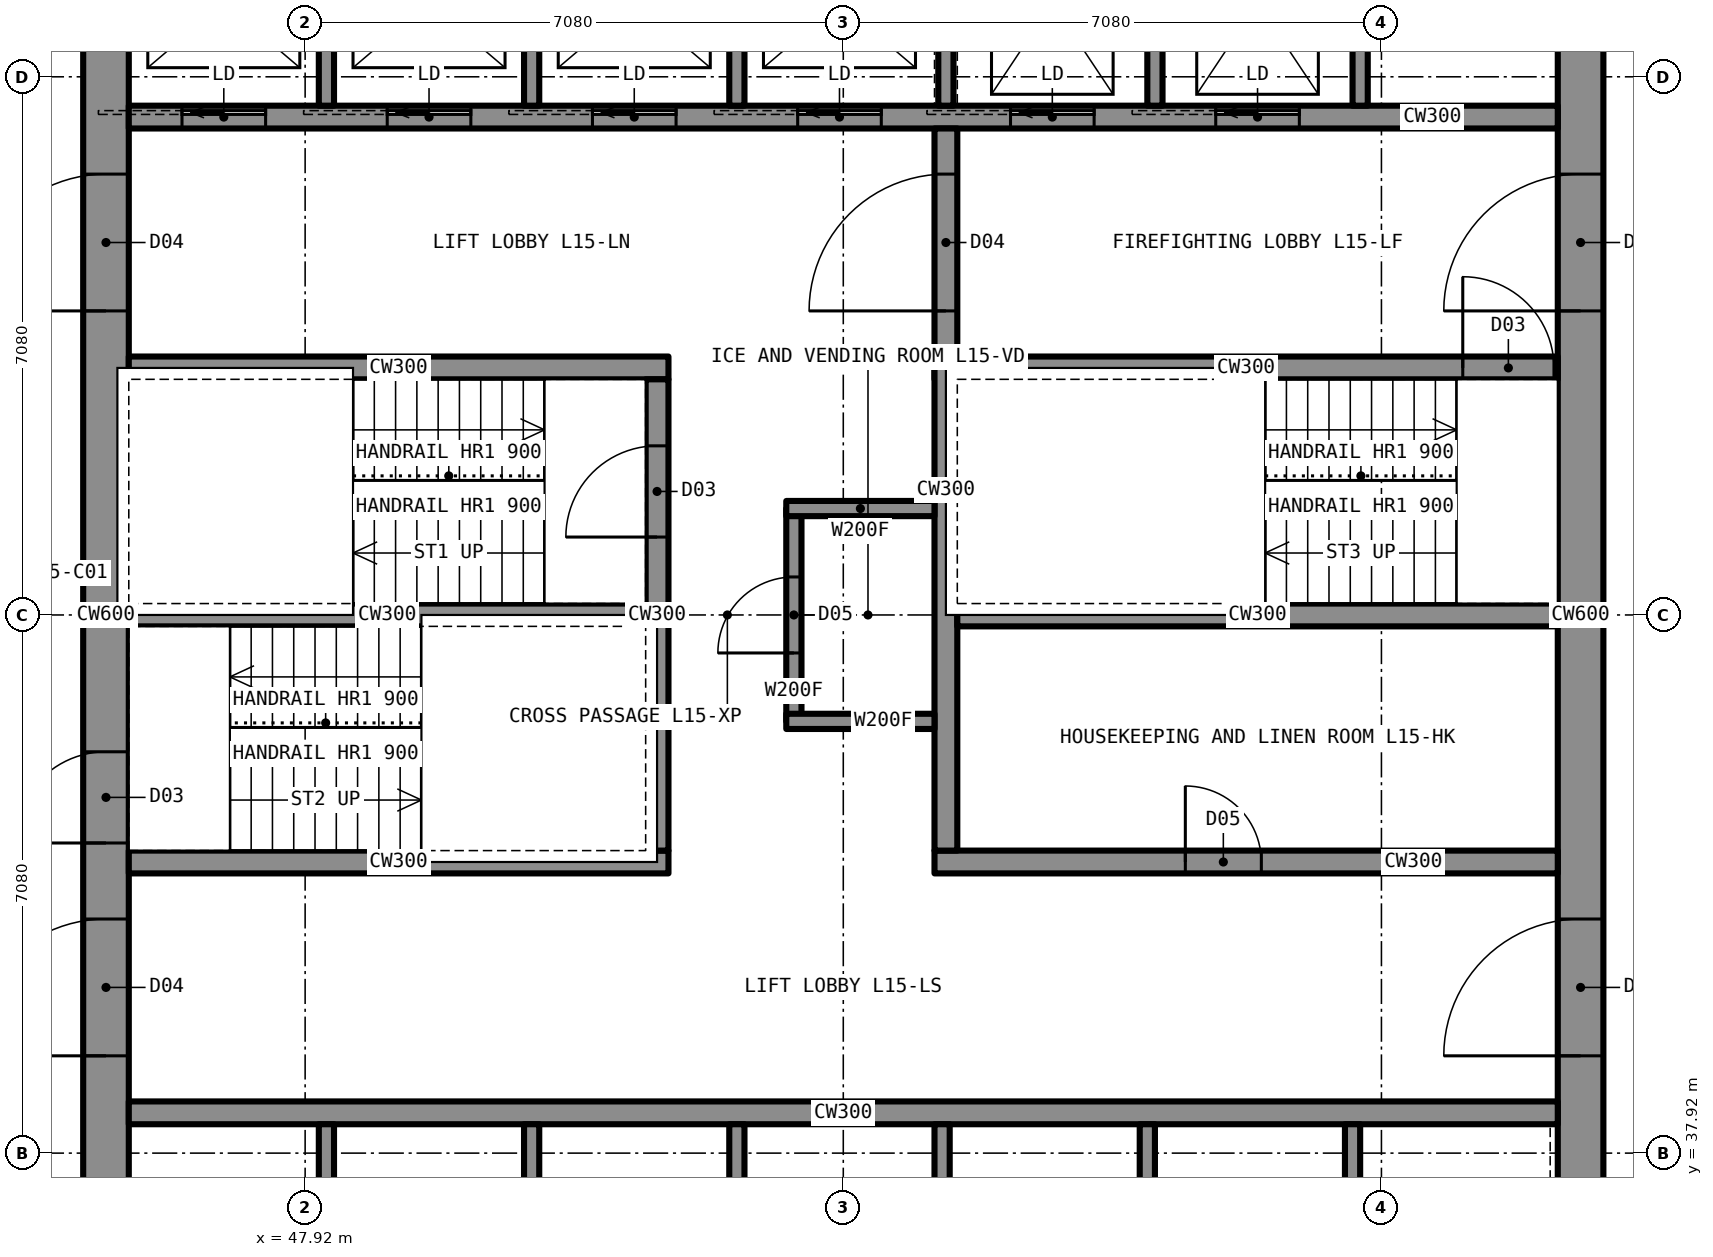
"""IFC4 building model, lengths in metres.
Left out: names, types, materials, properties, quantities, classifications, styles, units other than length and angle.
Written with IfcOpenShell. Run it as: python <this file> out.ifc"""

import sys

from ifc_helpers import new_model, si_unit, direction, frame, frame_2d, origin, place, context, subcontext, project, spatial, rectangle, extrude, element, fill, save


model = new_model("IFC4")
c1 = context("Model", 3, precision=1e-05, world=origin(), true_north=direction((0.0, 1.0)))
c2 = subcontext(c1, "Body", "Model", "MODEL_VIEW")
j1 = project(units=[si_unit("LENGTHUNIT", "METRE"), si_unit("PLANEANGLEUNIT", "RADIAN")], contexts=[c1])
p1 = place(None, origin())
s1 = spatial("IfcSite", under=j1, at=p1, CompositionType="ELEMENT")
p2 = place(p1, origin())
s2 = spatial("IfcBuilding", under=s1, at=p2, CompositionType="ELEMENT")
p3 = place(p2, frame((0.0, 0.0, 60.0)))
s3 = spatial("IfcBuildingStorey", under=s2, at=p3, CompositionType="ELEMENT", Elevation=60.0)
p4 = place(p3, frame((64.7, 35.6, 0.0), z_axis=(0.0, 0.0, 1.0), x_axis=(0.0, 1.0, 0.0)))
e1 = element("IfcWall", 1, at=p4, inside=s3, PredefinedType="SHEAR", context=c2, shape_type="SweptSolid", body=[
    extrude(rectangle(XDim=18.8, YDim=0.6, at=frame_2d((9.4, 0.0))), origin(), (0.0, 0.0, 1.0), 3.5),
])
p5 = place(p4, frame((13.4, 0.0, 0.0)))
e2 = element("IfcOpeningElement", 2, at=p5, cuts=e1, PredefinedType="OPENING", context=c2, shape_type="SweptSolid", body=[
    extrude(rectangle(XDim=1.8, YDim=2.2, at=frame_2d((0.9, 1.1))), frame((0.0, 0.31, 0.0), z_axis=(0.0, -1.0, 0.0), x_axis=(1.0, 0.0, 0.0)), (0.0, 0.0, 1.0), 0.62),
])
p6 = place(p4, frame((3.6, 0.0, 0.0)))
e3 = element("IfcOpeningElement", 3, at=p6, cuts=e1, PredefinedType="OPENING", context=c2, shape_type="SweptSolid", body=[
    extrude(rectangle(XDim=1.8, YDim=2.2, at=frame_2d((0.9, 1.1))), frame((0.0, 0.31, 0.0), z_axis=(0.0, -1.0, 0.0), x_axis=(1.0, 0.0, 0.0)), (0.0, 0.0, 1.0), 0.62),
])
p7 = place(p3, frame((45.3, 35.6, 0.0), z_axis=(0.0, 0.0, 1.0), x_axis=(0.0, 1.0, 0.0)))
e4 = element("IfcWall", 4, at=p7, inside=s3, PredefinedType="SHEAR", context=c2, shape_type="SweptSolid", body=[
    extrude(rectangle(XDim=18.8, YDim=0.6, at=frame_2d((9.4, 0.0))), origin(), (0.0, 0.0, 1.0), 3.5),
])
p8 = place(p7, frame((13.4, 0.0, 0.0)))
e5 = element("IfcOpeningElement", 5, at=p8, cuts=e4, PredefinedType="OPENING", context=c2, shape_type="SweptSolid", body=[
    extrude(rectangle(XDim=1.8, YDim=2.2, at=frame_2d((0.9, 1.1))), frame((0.0, 0.31, 0.0), z_axis=(0.0, -1.0, 0.0), x_axis=(1.0, 0.0, 0.0)), (0.0, 0.0, 1.0), 0.62),
])
p9 = place(p7, frame((3.6, 0.0, 0.0)))
e6 = element("IfcOpeningElement", 6, at=p9, cuts=e4, PredefinedType="OPENING", context=c2, shape_type="SweptSolid", body=[
    extrude(rectangle(XDim=1.8, YDim=2.2, at=frame_2d((0.9, 1.1))), frame((0.0, 0.31, 0.0), z_axis=(0.0, -1.0, 0.0), x_axis=(1.0, 0.0, 0.0)), (0.0, 0.0, 1.0), 0.62),
])
p10 = place(p7, frame((6.4, 0.0, 0.0)))
e7 = element("IfcOpeningElement", 7, at=p10, cuts=e4, PredefinedType="OPENING", context=c2, shape_type="SweptSolid", body=[
    extrude(rectangle(XDim=1.2, YDim=2.2, at=frame_2d((0.6, 1.1))), frame((0.0, 0.31, 0.0), z_axis=(0.0, -1.0, 0.0), x_axis=(1.0, 0.0, 0.0)), (0.0, 0.0, 1.0), 0.62),
])
p11 = place(p3, frame((45.6, 51.55, 0.0), z_axis=(0.0, 0.0, 1.0), x_axis=(1.0, 0.0, 0.0)))
e8 = element("IfcWall", 8, at=p11, inside=s3, PredefinedType="SHEAR", context=c2, shape_type="SweptSolid", body=[
    extrude(rectangle(XDim=18.8, YDim=0.3, at=frame_2d((9.4, 0.0))), origin(), (0.0, 0.0, 1.0), 3.5),
])
p12 = place(p11, frame((0.7, 0.0, 0.0)))
e9 = element("IfcOpeningElement", 9, at=p12, cuts=e8, PredefinedType="OPENING", context=c2, shape_type="SweptSolid", body=[
    extrude(rectangle(XDim=1.1, YDim=2.2, at=frame_2d((0.55, 1.1))), frame((0.0, 0.16, 0.0), z_axis=(0.0, -1.0, 0.0), x_axis=(1.0, 0.0, 0.0)), (0.0, 0.0, 1.0), 0.32),
])
p13 = place(p11, frame((3.4, 0.0, 0.0)))
e10 = element("IfcOpeningElement", 10, at=p13, cuts=e8, PredefinedType="OPENING", context=c2, shape_type="SweptSolid", body=[
    extrude(rectangle(XDim=1.1, YDim=2.2, at=frame_2d((0.55, 1.1))), frame((0.0, 0.16, 0.0), z_axis=(0.0, -1.0, 0.0), x_axis=(1.0, 0.0, 0.0)), (0.0, 0.0, 1.0), 0.32),
])
p14 = place(p11, frame((6.1, 0.0, 0.0)))
e11 = element("IfcOpeningElement", 11, at=p14, cuts=e8, PredefinedType="OPENING", context=c2, shape_type="SweptSolid", body=[
    extrude(rectangle(XDim=1.1, YDim=2.2, at=frame_2d((0.55, 1.1))), frame((0.0, 0.16, 0.0), z_axis=(0.0, -1.0, 0.0), x_axis=(1.0, 0.0, 0.0)), (0.0, 0.0, 1.0), 0.32),
])
p15 = place(p11, frame((8.8, 0.0, 0.0)))
e12 = element("IfcOpeningElement", 12, at=p15, cuts=e8, PredefinedType="OPENING", context=c2, shape_type="SweptSolid", body=[
    extrude(rectangle(XDim=1.1, YDim=2.2, at=frame_2d((0.55, 1.1))), frame((0.0, 0.16, 0.0), z_axis=(0.0, -1.0, 0.0), x_axis=(1.0, 0.0, 0.0)), (0.0, 0.0, 1.0), 0.32),
])
p16 = place(p11, frame((11.6, 0.0, 0.0)))
e13 = element("IfcOpeningElement", 13, at=p16, cuts=e8, PredefinedType="OPENING", context=c2, shape_type="SweptSolid", body=[
    extrude(rectangle(XDim=1.1, YDim=2.2, at=frame_2d((0.55, 1.1))), frame((0.0, 0.16, 0.0), z_axis=(0.0, -1.0, 0.0), x_axis=(1.0, 0.0, 0.0)), (0.0, 0.0, 1.0), 0.32),
])
p17 = place(p11, frame((14.3, 0.0, 0.0)))
e14 = element("IfcOpeningElement", 14, at=p17, cuts=e8, PredefinedType="OPENING", context=c2, shape_type="SweptSolid", body=[
    extrude(rectangle(XDim=1.1, YDim=2.2, at=frame_2d((0.55, 1.1))), frame((0.0, 0.16, 0.0), z_axis=(0.0, -1.0, 0.0), x_axis=(1.0, 0.0, 0.0)), (0.0, 0.0, 1.0), 0.32),
])
p18 = place(p3, frame((45.6, 38.45, 0.0), z_axis=(0.0, 0.0, 1.0), x_axis=(1.0, 0.0, 0.0)))
e15 = element("IfcWall", 15, at=p18, inside=s3, PredefinedType="SHEAR", context=c2, shape_type="SweptSolid", body=[
    extrude(rectangle(XDim=18.8, YDim=0.3, at=frame_2d((9.4, 0.0))), origin(), (0.0, 0.0, 1.0), 3.5),
])
p19 = place(p3, frame((45.6, 48.25, 0.0), z_axis=(0.0, 0.0, 1.0), x_axis=(1.0, 0.0, 0.0)))
e16 = element("IfcWall", 16, at=p19, inside=s3, PredefinedType="SHEAR", context=c2, shape_type="SweptSolid", body=[
    extrude(rectangle(XDim=7.1, YDim=0.3, at=frame_2d((3.55, 0.0))), origin(), (0.0, 0.0, 1.0), 3.5),
])
p20 = place(p3, frame((56.2, 48.25, 0.0), z_axis=(0.0, 0.0, 1.0), x_axis=(1.0, 0.0, 0.0)))
e17 = element("IfcWall", 17, at=p20, inside=s3, PredefinedType="SHEAR", context=c2, shape_type="SweptSolid", body=[
    extrude(rectangle(XDim=8.2, YDim=0.3, at=frame_2d((4.1, 0.0))), origin(), (0.0, 0.0, 1.0), 3.5),
])
p21 = place(p20, frame((6.95, 0.0, 0.0)))
e18 = element("IfcOpeningElement", 18, at=p21, cuts=e17, PredefinedType="OPENING", context=c2, shape_type="SweptSolid", body=[
    extrude(rectangle(XDim=1.2, YDim=2.2, at=frame_2d((0.6, 1.1))), frame((0.0, 0.16, 0.0), z_axis=(0.0, -1.0, 0.0), x_axis=(1.0, 0.0, 0.0)), (0.0, 0.0, 1.0), 0.32),
])
p22 = place(p3, frame((45.6, 41.75, 0.0), z_axis=(0.0, 0.0, 1.0), x_axis=(1.0, 0.0, 0.0)))
e19 = element("IfcWall", 19, at=p22, inside=s3, PredefinedType="SHEAR", context=c2, shape_type="SweptSolid", body=[
    extrude(rectangle(XDim=7.1, YDim=0.3, at=frame_2d((3.55, 0.0))), origin(), (0.0, 0.0, 1.0), 3.5),
])
p23 = place(p3, frame((56.2, 41.75, 0.0), z_axis=(0.0, 0.0, 1.0), x_axis=(1.0, 0.0, 0.0)))
e20 = element("IfcWall", 20, at=p23, inside=s3, PredefinedType="SHEAR", context=c2, shape_type="SweptSolid", body=[
    extrude(rectangle(XDim=8.2, YDim=0.3, at=frame_2d((4.1, 0.0))), origin(), (0.0, 0.0, 1.0), 3.5),
])
p24 = place(p23, frame((3.3, 0.0, 0.0)))
e21 = element("IfcOpeningElement", 21, at=p24, cuts=e20, PredefinedType="OPENING", context=c2, shape_type="SweptSolid", body=[
    extrude(rectangle(XDim=1.0, YDim=2.1, at=frame_2d((0.5, 1.05))), frame((0.0, 0.16, 0.0), z_axis=(0.0, -1.0, 0.0), x_axis=(1.0, 0.0, 0.0)), (0.0, 0.0, 1.0), 0.32),
])
p25 = place(p3, frame((52.55, 41.9, 0.0), z_axis=(0.0, 0.0, 1.0), x_axis=(0.0, 1.0, 0.0)))
e22 = element("IfcWall", 22, at=p25, inside=s3, PredefinedType="SHEAR", context=c2, shape_type="SweptSolid", body=[
    extrude(rectangle(XDim=6.2, YDim=0.3, at=frame_2d((3.1, 0.0))), origin(), (0.0, 0.0, 1.0), 3.5),
])
p26 = place(p25, frame((4.125, 0.0, 0.0)))
e23 = element("IfcOpeningElement", 23, at=p26, cuts=e22, PredefinedType="OPENING", context=c2, shape_type="SweptSolid", body=[
    extrude(rectangle(XDim=1.2, YDim=2.2, at=frame_2d((0.6, 1.1))), frame((0.0, 0.16, 0.0), z_axis=(0.0, -1.0, 0.0), x_axis=(1.0, 0.0, 0.0)), (0.0, 0.0, 1.0), 0.32),
])
p27 = place(p3, frame((56.35, 41.9, 0.0), z_axis=(0.0, 0.0, 1.0), x_axis=(0.0, 1.0, 0.0)))
e24 = element("IfcWall", 24, at=p27, inside=s3, PredefinedType="SHEAR", context=c2, shape_type="SweptSolid", body=[
    extrude(rectangle(XDim=9.5, YDim=0.3, at=frame_2d((4.75, 0.0))), origin(), (0.0, 0.0, 1.0), 3.5),
])
p28 = place(p27, frame((7.1, 0.0, 0.0)))
e25 = element("IfcOpeningElement", 25, at=p28, cuts=e24, PredefinedType="OPENING", context=c2, shape_type="SweptSolid", body=[
    extrude(rectangle(XDim=1.8, YDim=2.2, at=frame_2d((0.9, 1.1))), frame((0.0, 0.16, 0.0), z_axis=(0.0, -1.0, 0.0), x_axis=(1.0, 0.0, 0.0)), (0.0, 0.0, 1.0), 0.32),
])
p29 = place(p3, frame((45.6, 45.0, 0.0), z_axis=(0.0, 0.0, 1.0), x_axis=(1.0, 0.0, 0.0)))
e26 = element("IfcWall", 26, at=p29, inside=s3, PredefinedType="SHEAR", context=c2, shape_type="SweptSolid", body=[
    extrude(rectangle(XDim=6.8, YDim=0.3, at=frame_2d((3.4, 0.0))), origin(), (0.0, 0.0, 1.0), 3.5),
])
p30 = place(p3, frame((56.5, 45.0, 0.0), z_axis=(0.0, 0.0, 1.0), x_axis=(1.0, 0.0, 0.0)))
e27 = element("IfcWall", 27, at=p30, inside=s3, PredefinedType="SHEAR", context=c2, shape_type="SweptSolid", body=[
    extrude(rectangle(XDim=7.9, YDim=0.3, at=frame_2d((3.95, 0.0))), origin(), (0.0, 0.0, 1.0), 3.5),
])
p31 = place(p3, frame((54.35, 43.6, 0.0), z_axis=(0.0, 0.0, 1.0), x_axis=(0.0, 1.0, 0.0)))
e28 = element("IfcWall", 28, at=p31, inside=s3, PredefinedType="PARTITIONING", context=c2, shape_type="SweptSolid", body=[
    extrude(rectangle(XDim=2.8, YDim=0.2, at=frame_2d((1.4, 0.0))), origin(), (0.0, 0.0, 1.0), 3.33),
])
p32 = place(p31, frame((0.9, 0.0, 0.0)))
e29 = element("IfcOpeningElement", 29, at=p32, cuts=e28, PredefinedType="OPENING", context=c2, shape_type="SweptSolid", body=[
    extrude(rectangle(XDim=1.0, YDim=2.1, at=frame_2d((0.5, 1.05))), frame((0.0, 0.11, 0.0), z_axis=(0.0, -1.0, 0.0), x_axis=(1.0, 0.0, 0.0)), (0.0, 0.0, 1.0), 0.22),
])
for number, where, z_axis, x_axis in (
    (30, (54.25, 43.6, 0.0), (0.0, 0.0, 1.0), (1.0, 0.0, 0.0)),
    (31, (54.25, 46.4, 0.0), (0.0, 0.0, 1.0), (1.0, 0.0, 0.0)),
):
    element("IfcWall", number, at=place(p3, frame(where, z_axis=z_axis, x_axis=x_axis)), inside=s3, PredefinedType="PARTITIONING", context=c2, shape_type="SweptSolid", body=[
        extrude(rectangle(XDim=1.95, YDim=0.2, at=frame_2d((0.975, 0.0))), origin(), (0.0, 0.0, 1.0), 3.33),
    ])
for number, where, z_axis, x_axis in (
    (32, (48.2, 51.7, 0.0), (0.0, 0.0, 1.0), (0.0, 1.0, 0.0)),
    (33, (50.9, 51.7, 0.0), (0.0, 0.0, 1.0), (0.0, 1.0, 0.0)),
    (34, (53.6, 51.7, 0.0), (0.0, 0.0, 1.0), (0.0, 1.0, 0.0)),
    (35, (59.1, 51.7, 0.0), (0.0, 0.0, 1.0), (0.0, 1.0, 0.0)),
    (36, (61.8, 51.7, 0.0), (0.0, 0.0, 1.0), (0.0, 1.0, 0.0)),
    (37, (56.35, 51.7, 0.0), (0.0, 0.0, 1.0), (0.0, 1.0, 0.0)),
    (38, (48.2, 35.6, 0.0), (0.0, 0.0, 1.0), (0.0, 1.0, 0.0)),
    (39, (50.9, 35.6, 0.0), (0.0, 0.0, 1.0), (0.0, 1.0, 0.0)),
    (40, (53.6, 35.6, 0.0), (0.0, 0.0, 1.0), (0.0, 1.0, 0.0)),
    (41, (56.3, 35.6, 0.0), (0.0, 0.0, 1.0), (0.0, 1.0, 0.0)),
    (42, (59.0, 35.6, 0.0), (0.0, 0.0, 1.0), (0.0, 1.0, 0.0)),
    (43, (61.7, 35.6, 0.0), (0.0, 0.0, 1.0), (0.0, 1.0, 0.0)),
):
    element("IfcWall", number, at=place(p3, frame(where, z_axis=z_axis, x_axis=x_axis)), inside=s3, PredefinedType="PARTITIONING", context=c2, shape_type="SweptSolid", body=[
        extrude(rectangle(XDim=2.7, YDim=0.2, at=frame_2d((1.35, 0.0))), origin(), (0.0, 0.0, 1.0), 3.33),
    ])
p33 = place(p32, origin())
e44 = element("IfcDoor", 44, at=p33, inside=s3, OperationType="SINGLE_SWING_LEFT", PredefinedType="DOOR", context=c2, shape_type="SweptSolid", body=[
    extrude(rectangle(XDim=1.0, YDim=2.1, at=frame_2d((0.5, 1.05))), frame((0.0, 0.025, 0.0), z_axis=(0.0, -1.0, 0.0), x_axis=(1.0, 0.0, 0.0)), (0.0, 0.0, 1.0), 0.05),
])
fill(e29, e44)
p34 = place(p8, origin())
e45 = element("IfcDoor", 45, at=p34, inside=s3, OperationType="DOUBLE_DOOR_SINGLE_SWING", PredefinedType="DOOR", context=c2, shape_type="SweptSolid", body=[
    extrude(rectangle(XDim=1.8, YDim=2.2, at=frame_2d((0.9, 1.1))), frame((0.0, 0.025, 0.0), z_axis=(0.0, -1.0, 0.0), x_axis=(1.0, 0.0, 0.0)), (0.0, 0.0, 1.0), 0.05),
])
fill(e5, e45)
p35 = place(p9, origin())
e46 = element("IfcDoor", 46, at=p35, inside=s3, OperationType="DOUBLE_DOOR_SINGLE_SWING", PredefinedType="DOOR", context=c2, shape_type="SweptSolid", body=[
    extrude(rectangle(XDim=1.8, YDim=2.2, at=frame_2d((0.9, 1.1))), frame((0.0, 0.025, 0.0), z_axis=(0.0, -1.0, 0.0), x_axis=(1.0, 0.0, 0.0)), (0.0, 0.0, 1.0), 0.05),
])
fill(e6, e46)
p36 = place(p5, origin())
e47 = element("IfcDoor", 47, at=p36, inside=s3, OperationType="DOUBLE_DOOR_SINGLE_SWING", PredefinedType="DOOR", context=c2, shape_type="SweptSolid", body=[
    extrude(rectangle(XDim=1.8, YDim=2.2, at=frame_2d((0.9, 1.1))), frame((0.0, 0.025, 0.0), z_axis=(0.0, -1.0, 0.0), x_axis=(1.0, 0.0, 0.0)), (0.0, 0.0, 1.0), 0.05),
])
fill(e2, e47)
p37 = place(p6, origin())
e48 = element("IfcDoor", 48, at=p37, inside=s3, OperationType="DOUBLE_DOOR_SINGLE_SWING", PredefinedType="DOOR", context=c2, shape_type="SweptSolid", body=[
    extrude(rectangle(XDim=1.8, YDim=2.2, at=frame_2d((0.9, 1.1))), frame((0.0, 0.025, 0.0), z_axis=(0.0, -1.0, 0.0), x_axis=(1.0, 0.0, 0.0)), (0.0, 0.0, 1.0), 0.05),
])
fill(e3, e48)
p38 = place(p28, origin())
e49 = element("IfcDoor", 49, at=p38, inside=s3, OperationType="DOUBLE_DOOR_SINGLE_SWING", PredefinedType="DOOR", context=c2, shape_type="SweptSolid", body=[
    extrude(rectangle(XDim=1.8, YDim=2.2, at=frame_2d((0.9, 1.1))), frame((0.0, 0.025, 0.0), z_axis=(0.0, -1.0, 0.0), x_axis=(1.0, 0.0, 0.0)), (0.0, 0.0, 1.0), 0.05),
])
fill(e25, e49)
p39 = place(p26, origin())
e50 = element("IfcDoor", 50, at=p39, inside=s3, OperationType="SINGLE_SWING_LEFT", PredefinedType="DOOR", context=c2, shape_type="SweptSolid", body=[
    extrude(rectangle(XDim=1.2, YDim=2.2, at=frame_2d((0.6, 1.1))), frame((0.0, 0.025, 0.0), z_axis=(0.0, -1.0, 0.0), x_axis=(1.0, 0.0, 0.0)), (0.0, 0.0, 1.0), 0.05),
])
fill(e23, e50)
p40 = place(p10, origin())
e51 = element("IfcDoor", 51, at=p40, inside=s3, OperationType="SINGLE_SWING_LEFT", PredefinedType="DOOR", context=c2, shape_type="SweptSolid", body=[
    extrude(rectangle(XDim=1.2, YDim=2.2, at=frame_2d((0.6, 1.1))), frame((0.0, 0.025, 0.0), z_axis=(0.0, -1.0, 0.0), x_axis=(1.0, 0.0, 0.0)), (0.0, 0.0, 1.0), 0.05),
])
fill(e7, e51)
p41 = place(p21, origin())
e52 = element("IfcDoor", 52, at=p41, inside=s3, OperationType="SINGLE_SWING_LEFT", PredefinedType="DOOR", context=c2, shape_type="SweptSolid", body=[
    extrude(rectangle(XDim=1.2, YDim=2.2, at=frame_2d((0.6, 1.1))), frame((0.0, 0.025, 0.0), z_axis=(0.0, -1.0, 0.0), x_axis=(1.0, 0.0, 0.0)), (0.0, 0.0, 1.0), 0.05),
])
fill(e18, e52)
p42 = place(p24, origin())
e53 = element("IfcDoor", 53, at=p42, inside=s3, OperationType="SINGLE_SWING_LEFT", PredefinedType="DOOR", context=c2, shape_type="SweptSolid", body=[
    extrude(rectangle(XDim=1.0, YDim=2.1, at=frame_2d((0.5, 1.05))), frame((0.0, 0.025, 0.0), z_axis=(0.0, -1.0, 0.0), x_axis=(1.0, 0.0, 0.0)), (0.0, 0.0, 1.0), 0.05),
])
fill(e21, e53)
p43 = place(p12, origin())
e54 = element("IfcDoor", 54, at=p43, inside=s3, OperationType="SLIDING_TO_LEFT", PredefinedType="DOOR", context=c2, shape_type="SweptSolid", body=[
    extrude(rectangle(XDim=1.1, YDim=2.2, at=frame_2d((0.55, 1.1))), frame((0.0, 0.025, 0.0), z_axis=(0.0, -1.0, 0.0), x_axis=(1.0, 0.0, 0.0)), (0.0, 0.0, 1.0), 0.05),
])
fill(e9, e54)
p44 = place(p13, origin())
e55 = element("IfcDoor", 55, at=p44, inside=s3, OperationType="SLIDING_TO_LEFT", PredefinedType="DOOR", context=c2, shape_type="SweptSolid", body=[
    extrude(rectangle(XDim=1.1, YDim=2.2, at=frame_2d((0.55, 1.1))), frame((0.0, 0.025, 0.0), z_axis=(0.0, -1.0, 0.0), x_axis=(1.0, 0.0, 0.0)), (0.0, 0.0, 1.0), 0.05),
])
fill(e10, e55)
p45 = place(p14, origin())
e56 = element("IfcDoor", 56, at=p45, inside=s3, OperationType="SLIDING_TO_LEFT", PredefinedType="DOOR", context=c2, shape_type="SweptSolid", body=[
    extrude(rectangle(XDim=1.1, YDim=2.2, at=frame_2d((0.55, 1.1))), frame((0.0, 0.025, 0.0), z_axis=(0.0, -1.0, 0.0), x_axis=(1.0, 0.0, 0.0)), (0.0, 0.0, 1.0), 0.05),
])
fill(e11, e56)
p46 = place(p15, origin())
e57 = element("IfcDoor", 57, at=p46, inside=s3, OperationType="SLIDING_TO_LEFT", PredefinedType="DOOR", context=c2, shape_type="SweptSolid", body=[
    extrude(rectangle(XDim=1.1, YDim=2.2, at=frame_2d((0.55, 1.1))), frame((0.0, 0.025, 0.0), z_axis=(0.0, -1.0, 0.0), x_axis=(1.0, 0.0, 0.0)), (0.0, 0.0, 1.0), 0.05),
])
fill(e12, e57)
p47 = place(p16, origin())
e58 = element("IfcDoor", 58, at=p47, inside=s3, OperationType="SLIDING_TO_LEFT", PredefinedType="DOOR", context=c2, shape_type="SweptSolid", body=[
    extrude(rectangle(XDim=1.1, YDim=2.2, at=frame_2d((0.55, 1.1))), frame((0.0, 0.025, 0.0), z_axis=(0.0, -1.0, 0.0), x_axis=(1.0, 0.0, 0.0)), (0.0, 0.0, 1.0), 0.05),
])
fill(e13, e58)
p48 = place(p17, origin())
e59 = element("IfcDoor", 59, at=p48, inside=s3, OperationType="SLIDING_TO_LEFT", PredefinedType="DOOR", context=c2, shape_type="SweptSolid", body=[
    extrude(rectangle(XDim=1.1, YDim=2.2, at=frame_2d((0.55, 1.1))), frame((0.0, 0.025, 0.0), z_axis=(0.0, -1.0, 0.0), x_axis=(1.0, 0.0, 0.0)), (0.0, 0.0, 1.0), 0.05),
])
fill(e14, e59)
save(model, sys.argv[1])
